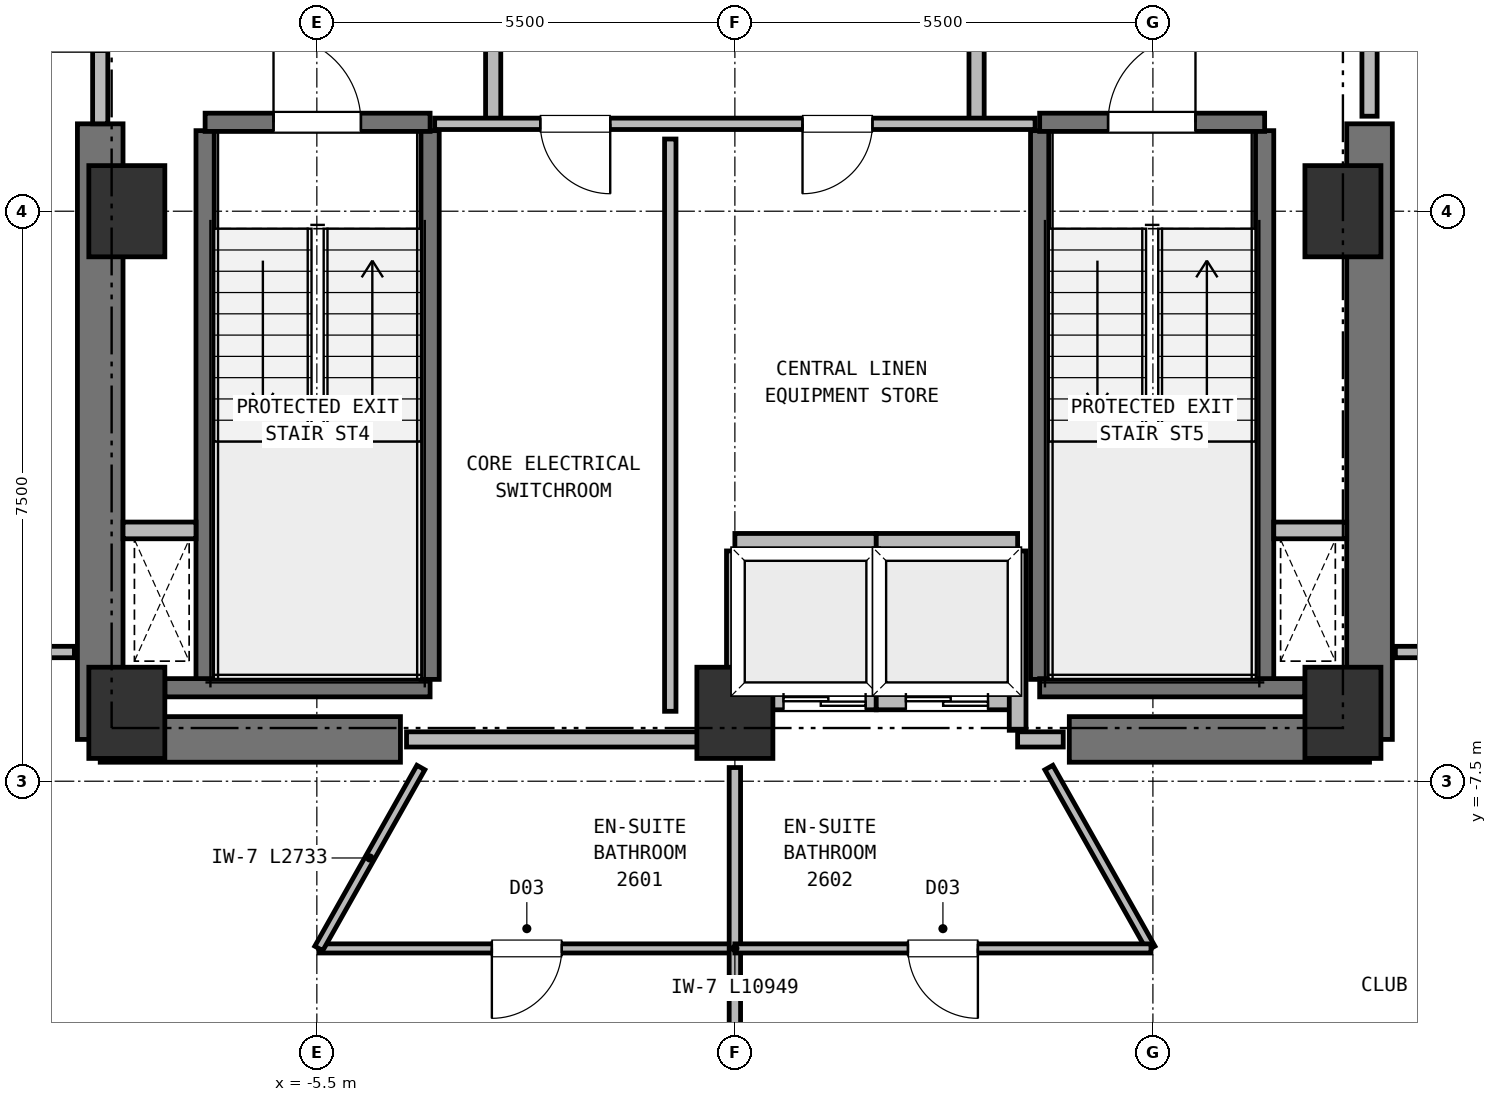
"""IFC4 building model, lengths in metres.
Left out: names, types, materials, properties, quantities, classifications, styles, units other than length and angle.
Written with IfcOpenShell. Run it as: python <this file> out.ifc"""

import sys

from ifc_helpers import new_model, si_unit, direction, frame, frame_2d, origin, origin_2d, place, context, subcontext, project, spatial, rectangle, extrude, element, fill, save


model = new_model("IFC4")
c1 = context("Model", 3, precision=1e-05, world=origin(), true_north=direction((0.0, 1.0)))
c2 = subcontext(c1, "Body", "Model", "MODEL_VIEW")
j1 = project(units=[si_unit("LENGTHUNIT", "METRE"), si_unit("PLANEANGLEUNIT", "RADIAN")], contexts=[c1])
p1 = place(None, origin())
s1 = spatial("IfcSite", under=j1, at=p1, CompositionType="ELEMENT")
p2 = place(p1, origin())
s2 = spatial("IfcBuilding", under=s1, at=p2, CompositionType="ELEMENT")
p3 = place(p2, frame((0.0, 0.0, 97.25)))
s3 = spatial("IfcBuildingStorey", under=s2, at=p3, CompositionType="ELEMENT", Elevation=97.25)
for number, where, z_axis, x_axis in (
    (1, (-8.0, -6.6, 0.0), (0.0, 0.0, 1.0), (1.0, 0.0, 0.0)),
    (2, (0.0, -6.6, 0.0), (0.0, 0.0, 1.0), (1.0, 0.0, 0.0)),
    (3, (8.0, -6.6, 0.0), (0.0, 0.0, 1.0), (1.0, 0.0, 0.0)),
    (4, (8.0, 0.0, 0.0), (0.0, 0.0, 1.0), (1.0, 0.0, 0.0)),
    (5, (-8.0, 0.0, 0.0), (0.0, 0.0, 1.0), (1.0, 0.0, 0.0)),
):
    element("IfcColumn", number, at=place(p3, frame(where, z_axis=z_axis, x_axis=x_axis)), inside=s3, PredefinedType="COLUMN", context=c2, shape_type="SweptSolid", body=[
        extrude(rectangle(XDim=1.0, YDim=1.2, at=origin_2d()), origin(), (0.0, 0.0, 1.0), 3.75),
    ])
for number, where, z_axis, x_axis in (
    (6, (-8.35, -6.95, 0.0), (0.0, 0.0, 1.0), (1.0, 0.0, 0.0)),
    (7, (4.4, -6.95, 0.0), (0.0, 0.0, 1.0), (1.0, 0.0, 0.0)),
):
    element("IfcWall", number, at=place(p3, frame(where, z_axis=z_axis, x_axis=x_axis)), inside=s3, PredefinedType="SHEAR", context=c2, shape_type="SweptSolid", body=[
        extrude(rectangle(XDim=3.95, YDim=0.6, at=frame_2d((1.975, 0.0))), origin(), (0.0, 0.0, 1.0), 3.5),
    ])
for number, where, z_axis, x_axis in (
    (8, (-8.35, -6.95, 0.0), (0.0, 0.0, 1.0), (0.0, 1.0, 0.0)),
    (9, (8.35, -6.95, 0.0), (0.0, 0.0, 1.0), (0.0, 1.0, 0.0)),
):
    element("IfcWall", number, at=place(p3, frame(where, z_axis=z_axis, x_axis=x_axis)), inside=s3, PredefinedType="SHEAR", context=c2, shape_type="SweptSolid", body=[
        extrude(rectangle(XDim=8.1, YDim=0.6, at=frame_2d((4.05, 0.0))), origin(), (0.0, 0.0, 1.0), 3.5),
    ])
p4 = place(p3, frame((-6.97, -6.16, 0.0), z_axis=(0.0, 0.0, 1.0), x_axis=(0.0, 1.0, 0.0)))
e10 = element("IfcWall", 10, at=p4, inside=s3, PredefinedType="SHEAR", context=c2, shape_type="SweptSolid", body=[
    extrude(rectangle(XDim=7.22, YDim=0.24, at=frame_2d((3.61, 0.0))), origin(), (0.0, 0.0, 1.0), 3.5),
])
p5 = place(p3, frame((-7.5, -6.27, 0.0), z_axis=(0.0, 0.0, 1.0), x_axis=(1.0, 0.0, 0.0)))
e11 = element("IfcWall", 11, at=p5, inside=s3, PredefinedType="SHEAR", context=c2, shape_type="SweptSolid", body=[
    extrude(rectangle(XDim=3.49, YDim=0.24, at=frame_2d((1.745, 0.0))), origin(), (0.0, 0.0, 1.0), 3.5),
])
p6 = place(p3, frame((-4.01, -6.16, 0.0), z_axis=(0.0, 0.0, 1.0), x_axis=(0.0, 1.0, 0.0)))
e12 = element("IfcWall", 12, at=p6, inside=s3, PredefinedType="SHEAR", context=c2, shape_type="SweptSolid", body=[
    extrude(rectangle(XDim=7.22, YDim=0.24, at=frame_2d((3.61, 0.0))), origin(), (0.0, 0.0, 1.0), 3.5),
])
p7 = place(p3, frame((-6.97, 1.17, 0.0), z_axis=(0.0, 0.0, 1.0), x_axis=(1.0, 0.0, 0.0)))
e13 = element("IfcWall", 13, at=p7, inside=s3, PredefinedType="SHEAR", context=c2, shape_type="SweptSolid", body=[
    extrude(rectangle(XDim=2.96, YDim=0.24, at=frame_2d((1.48, 0.0))), origin(), (0.0, 0.0, 1.0), 3.5),
])
p8 = place(p7, frame((0.9, 0.0, 0.0)))
e14 = element("IfcOpeningElement", 14, at=p8, cuts=e13, PredefinedType="OPENING", context=c2, shape_type="SweptSolid", body=[
    extrude(rectangle(XDim=1.15, YDim=2.15, at=frame_2d((0.575, 1.075))), frame((0.0, 0.13, 0.0), z_axis=(0.0, -1.0, 0.0), x_axis=(1.0, 0.0, 0.0)), (0.0, 0.0, 1.0), 0.26),
])
for number, where, z_axis, x_axis in (
    (15, (4.01, -6.16, 0.0), (0.0, 0.0, 1.0), (0.0, 1.0, 0.0)),
    (16, (6.97, -6.16, 0.0), (0.0, 0.0, 1.0), (0.0, 1.0, 0.0)),
):
    element("IfcWall", number, at=place(p3, frame(where, z_axis=z_axis, x_axis=x_axis)), inside=s3, PredefinedType="SHEAR", context=c2, shape_type="SweptSolid", body=[
        extrude(rectangle(XDim=7.22, YDim=0.24, at=frame_2d((3.61, 0.0))), origin(), (0.0, 0.0, 1.0), 3.5),
    ])
p9 = place(p3, frame((4.01, -6.27, 0.0), z_axis=(0.0, 0.0, 1.0), x_axis=(1.0, 0.0, 0.0)))
e17 = element("IfcWall", 17, at=p9, inside=s3, PredefinedType="SHEAR", context=c2, shape_type="SweptSolid", body=[
    extrude(rectangle(XDim=3.49, YDim=0.24, at=frame_2d((1.745, 0.0))), origin(), (0.0, 0.0, 1.0), 3.5),
])
p10 = place(p3, frame((4.01, 1.17, 0.0), z_axis=(0.0, 0.0, 1.0), x_axis=(1.0, 0.0, 0.0)))
e18 = element("IfcWall", 18, at=p10, inside=s3, PredefinedType="SHEAR", context=c2, shape_type="SweptSolid", body=[
    extrude(rectangle(XDim=2.96, YDim=0.24, at=frame_2d((1.48, 0.0))), origin(), (0.0, 0.0, 1.0), 3.5),
])
p11 = place(p10, frame((0.9, 0.0, 0.0)))
e19 = element("IfcOpeningElement", 19, at=p11, cuts=e18, PredefinedType="OPENING", context=c2, shape_type="SweptSolid", body=[
    extrude(rectangle(XDim=1.15, YDim=2.15, at=frame_2d((0.575, 1.075))), frame((0.0, 0.13, 0.0), z_axis=(0.0, -1.0, 0.0), x_axis=(1.0, 0.0, 0.0)), (0.0, 0.0, 1.0), 0.26),
])
for number, where, z_axis, x_axis in (
    (20, (-8.05, -4.2, 0.0), (0.0, 0.0, 1.0), (1.0, 0.0, 0.0)),
    (21, (7.09, -4.2, 0.0), (0.0, 0.0, 1.0), (1.0, 0.0, 0.0)),
):
    element("IfcWall", number, at=place(p3, frame(where, z_axis=z_axis, x_axis=x_axis)), inside=s3, PredefinedType="PARTITIONING", context=c2, shape_type="SweptSolid", body=[
        extrude(rectangle(XDim=0.96, YDim=0.22, at=frame_2d((0.48, 0.0))), origin(), (0.0, 0.0, 1.0), 3.5),
    ])
p12 = place(p3, frame((0.0, -6.45, 0.0), z_axis=(0.0, 0.0, 1.0), x_axis=(1.0, 0.0, 0.0)))
e22 = element("IfcWall", 22, at=p12, inside=s3, PredefinedType="PARTITIONING", context=c2, shape_type="SweptSolid", body=[
    extrude(rectangle(XDim=1.86, YDim=0.22, at=frame_2d((0.93, 0.0))), origin(), (0.0, 0.0, 1.0), 3.12),
])
p13 = place(p12, frame((0.64, 0.0, 0.0)))
e23 = element("IfcOpeningElement", 23, at=p13, cuts=e22, PredefinedType="OPENING", context=c2, shape_type="SweptSolid", body=[
    extrude(rectangle(XDim=1.08, YDim=2.15, at=frame_2d((0.54, 1.075))), frame((0.0, 0.12, 0.0), z_axis=(0.0, -1.0, 0.0), x_axis=(1.0, 0.0, 0.0)), (0.0, 0.0, 1.0), 0.24),
])
for number, where, z_axis, x_axis in (
    (24, (0.0, -4.35, 0.0), (0.0, 0.0, 1.0), (1.0, 0.0, 0.0)),
    (25, (0.0, -6.33, 0.0), (0.0, 0.0, 1.0), (0.0, 1.0, 0.0)),
    (26, (1.86, -6.33, 0.0), (0.0, 0.0, 1.0), (0.0, 1.0, 0.0)),
):
    element("IfcWall", number, at=place(p3, frame(where, z_axis=z_axis, x_axis=x_axis)), inside=s3, PredefinedType="PARTITIONING", context=c2, shape_type="SweptSolid", body=[
        extrude(rectangle(XDim=1.86, YDim=0.22, at=frame_2d((0.93, 0.0))), origin(), (0.0, 0.0, 1.0), 3.5),
    ])
p14 = place(p3, frame((1.86, -6.45, 0.0), z_axis=(0.0, 0.0, 1.0), x_axis=(1.0, 0.0, 0.0)))
e27 = element("IfcWall", 27, at=p14, inside=s3, PredefinedType="PARTITIONING", context=c2, shape_type="SweptSolid", body=[
    extrude(rectangle(XDim=1.86, YDim=0.22, at=frame_2d((0.93, 0.0))), origin(), (0.0, 0.0, 1.0), 3.12),
])
p15 = place(p14, frame((0.39, 0.0, 0.0)))
e28 = element("IfcOpeningElement", 28, at=p15, cuts=e27, PredefinedType="OPENING", context=c2, shape_type="SweptSolid", body=[
    extrude(rectangle(XDim=1.08, YDim=2.15, at=frame_2d((0.54, 1.075))), frame((0.0, 0.12, 0.0), z_axis=(0.0, -1.0, 0.0), x_axis=(1.0, 0.0, 0.0)), (0.0, 0.0, 1.0), 0.24),
])
p16 = place(p3, frame((1.86, -4.35, 0.0), z_axis=(0.0, 0.0, 1.0), x_axis=(1.0, 0.0, 0.0)))
e29 = element("IfcWall", 29, at=p16, inside=s3, PredefinedType="PARTITIONING", context=c2, shape_type="SweptSolid", body=[
    extrude(rectangle(XDim=1.86, YDim=0.22, at=frame_2d((0.93, 0.0))), origin(), (0.0, 0.0, 1.0), 3.5),
])
p17 = place(p3, frame((3.72, -6.83, 0.0), z_axis=(0.0, 0.0, 1.0), x_axis=(0.0, 1.0, 0.0)))
e30 = element("IfcWall", 30, at=p17, inside=s3, PredefinedType="PARTITIONING", context=c2, shape_type="SweptSolid", body=[
    extrude(rectangle(XDim=2.36, YDim=0.22, at=frame_2d((1.18, 0.0))), origin(), (0.0, 0.0, 1.0), 3.5),
])
p18 = place(p3, frame((-3.18, 1.15, 0.0), z_axis=(0.0, 0.0, 1.0), x_axis=(0.0, 1.0, 0.0)))
e31 = element("IfcWall", 31, at=p18, inside=s3, PredefinedType="PARTITIONING", context=c2, shape_type="SweptSolid", body=[
    extrude(rectangle(XDim=3.3, YDim=0.2, at=frame_2d((1.65, 0.0))), origin(), (0.0, 0.0, 1.0), 3.5),
])
p19 = place(p18, frame((1.08, 0.0, 0.0)))
e32 = element("IfcOpeningElement", 32, at=p19, cuts=e31, PredefinedType="OPENING", context=c2, shape_type="SweptSolid", body=[
    extrude(rectangle(XDim=1.15, YDim=2.15, at=frame_2d((0.575, 1.075))), frame((0.0, 0.11, 0.0), z_axis=(0.0, -1.0, 0.0), x_axis=(1.0, 0.0, 0.0)), (0.0, 0.0, 1.0), 0.22),
])
p20 = place(p3, frame((3.18, 1.15, 0.0), z_axis=(0.0, 0.0, 1.0), x_axis=(0.0, 1.0, 0.0)))
e33 = element("IfcWall", 33, at=p20, inside=s3, PredefinedType="PARTITIONING", context=c2, shape_type="SweptSolid", body=[
    extrude(rectangle(XDim=3.3, YDim=0.2, at=frame_2d((1.65, 0.0))), origin(), (0.0, 0.0, 1.0), 3.5),
])
p21 = place(p20, frame((1.08, 0.0, 0.0)))
e34 = element("IfcOpeningElement", 34, at=p21, cuts=e33, PredefinedType="OPENING", context=c2, shape_type="SweptSolid", body=[
    extrude(rectangle(XDim=1.15, YDim=2.15, at=frame_2d((0.575, 1.075))), frame((0.0, 0.11, 0.0), z_axis=(0.0, -1.0, 0.0), x_axis=(1.0, 0.0, 0.0)), (0.0, 0.0, 1.0), 0.22),
])
p22 = place(p3, frame((-8.35, 1.15, 0.0), z_axis=(0.0, 0.0, 1.0), x_axis=(0.0, 1.0, 0.0)))
e35 = element("IfcWall", 35, at=p22, inside=s3, PredefinedType="PARTITIONING", context=c2, shape_type="SweptSolid", body=[
    extrude(rectangle(XDim=5.4, YDim=0.2, at=frame_2d((2.7, 0.0))), origin(), (0.0, 0.0, 1.0), 3.5),
])
p23 = place(p22, frame((0.95, 0.0, 0.0)))
e36 = element("IfcOpeningElement", 36, at=p23, cuts=e35, PredefinedType="OPENING", context=c2, shape_type="SweptSolid", body=[
    extrude(rectangle(XDim=1.15, YDim=2.15, at=frame_2d((0.575, 1.075))), frame((0.0, 0.11, 0.0), z_axis=(0.0, -1.0, 0.0), x_axis=(1.0, 0.0, 0.0)), (0.0, 0.0, 1.0), 0.22),
])
p24 = place(p3, frame((8.35, 1.25, 0.0), z_axis=(0.0, 0.0, 1.0), x_axis=(0.0, 1.0, 0.0)))
e37 = element("IfcWall", 37, at=p24, inside=s3, PredefinedType="PARTITIONING", context=c2, shape_type="SweptSolid", body=[
    extrude(rectangle(XDim=5.3, YDim=0.2, at=frame_2d((2.65, 0.0))), origin(), (0.0, 0.0, 1.0), 3.5),
])
p25 = place(p24, frame((0.95, 0.0, 0.0)))
e38 = element("IfcOpeningElement", 38, at=p25, cuts=e37, PredefinedType="OPENING", context=c2, shape_type="SweptSolid", body=[
    extrude(rectangle(XDim=1.15, YDim=2.15, at=frame_2d((0.575, 1.075))), frame((0.0, 0.11, 0.0), z_axis=(0.0, -1.0, 0.0), x_axis=(1.0, 0.0, 0.0)), (0.0, 0.0, 1.0), 0.22),
])
p26 = place(p3, frame((3.95, 1.15, 0.0), z_axis=(0.0, 0.0, 1.0), x_axis=(-1.0, 0.0, 0.0)))
e39 = element("IfcWall", 39, at=p26, inside=s3, PredefinedType="PARTITIONING", context=c2, shape_type="SweptSolid", body=[
    extrude(rectangle(XDim=7.9, YDim=0.15, at=frame_2d((3.95, 0.0))), origin(), (0.0, 0.0, 1.0), 3.5),
])
p27 = place(p26, frame((5.59, 0.0, 0.0)))
e40 = element("IfcOpeningElement", 40, at=p27, cuts=e39, PredefinedType="OPENING", context=c2, shape_type="SweptSolid", body=[
    extrude(rectangle(XDim=0.92, YDim=2.05, at=frame_2d((0.46, 1.025))), frame((0.0, 0.085, 0.0), z_axis=(0.0, -1.0, 0.0), x_axis=(1.0, 0.0, 0.0)), (0.0, 0.0, 1.0), 0.17),
])
p28 = place(p26, frame((2.14, 0.0, 0.0)))
e41 = element("IfcOpeningElement", 41, at=p28, cuts=e39, PredefinedType="OPENING", context=c2, shape_type="SweptSolid", body=[
    extrude(rectangle(XDim=0.92, YDim=2.05, at=frame_2d((0.46, 1.025))), frame((0.0, 0.085, 0.0), z_axis=(0.0, -1.0, 0.0), x_axis=(1.0, 0.0, 0.0)), (0.0, 0.0, 1.0), 0.17),
])
p29 = place(p3, frame((-4.32, -6.95, 0.0), z_axis=(0.0, 0.0, 1.0), x_axis=(1.0, 0.0, 0.0)))
e42 = element("IfcWall", 42, at=p29, inside=s3, PredefinedType="PARTITIONING", context=c2, shape_type="SweptSolid", body=[
    extrude(rectangle(XDim=4.32, YDim=0.2, at=frame_2d((2.16, 0.0))), origin(), (0.0, 0.0, 1.0), 3.5),
])
p30 = place(p3, frame((3.72, -6.95, 0.0), z_axis=(0.0, 0.0, 1.0), x_axis=(1.0, 0.0, 0.0)))
e43 = element("IfcWall", 43, at=p30, inside=s3, PredefinedType="PARTITIONING", context=c2, shape_type="SweptSolid", body=[
    extrude(rectangle(XDim=0.6, YDim=0.2, at=frame_2d((0.3, 0.0))), origin(), (0.0, 0.0, 1.0), 3.5),
])
p31 = place(p3, frame((-0.85, -6.58, 0.0), z_axis=(0.0, 0.0, 1.0), x_axis=(0.0, 1.0, 0.0)))
e44 = element("IfcWall", 44, at=p31, inside=s3, PredefinedType="PARTITIONING", context=c2, shape_type="SweptSolid", body=[
    extrude(rectangle(XDim=7.53, YDim=0.15, at=frame_2d((3.765, 0.0))), origin(), (0.0, 0.0, 1.0), 3.5),
])
p32 = place(p3, frame((-8.69, -5.8, 0.0), z_axis=(0.0, 0.0, 1.0), x_axis=(-1.0, 0.0, 0.0)))
e45 = element("IfcWall", 45, at=p32, inside=s3, PredefinedType="PARTITIONING", context=c2, shape_type="SweptSolid", body=[
    extrude(rectangle(XDim=2.02, YDim=0.15, at=frame_2d((1.01, 0.0))), origin(), (0.0, 0.0, 1.0), 3.5),
])
p33 = place(p32, frame((0.52, 0.0, 0.0)))
e46 = element("IfcOpeningElement", 46, at=p33, cuts=e45, PredefinedType="OPENING", context=c2, shape_type="SweptSolid", body=[
    extrude(rectangle(XDim=1.06, YDim=2.15, at=frame_2d((0.53, 1.075))), frame((0.0, 0.085, 0.0), z_axis=(0.0, -1.0, 0.0), x_axis=(1.0, 0.0, 0.0)), (0.0, 0.0, 1.0), 0.17),
])
p34 = place(p3, frame((10.71, -5.8, 0.0), z_axis=(0.0, 0.0, 1.0), x_axis=(-1.0, 0.0, 0.0)))
e47 = element("IfcWall", 47, at=p34, inside=s3, PredefinedType="PARTITIONING", context=c2, shape_type="SweptSolid", body=[
    extrude(rectangle(XDim=2.02, YDim=0.15, at=frame_2d((1.01, 0.0))), origin(), (0.0, 0.0, 1.0), 3.5),
])
p35 = place(p34, frame((0.52, 0.0, 0.0)))
e48 = element("IfcOpeningElement", 48, at=p35, cuts=e47, PredefinedType="OPENING", context=c2, shape_type="SweptSolid", body=[
    extrude(rectangle(XDim=1.06, YDim=2.15, at=frame_2d((0.53, 1.075))), frame((0.0, 0.085, 0.0), z_axis=(0.0, -1.0, 0.0), x_axis=(1.0, 0.0, 0.0)), (0.0, 0.0, 1.0), 0.17),
])
p36 = place(p3, frame((0.0, -9.7, 0.0), z_axis=(0.0, 0.0, 1.0), x_axis=(-1.0, 0.0, 0.0)))
e49 = element("IfcWall", 49, at=p36, inside=s3, PredefinedType="PARTITIONING", context=c2, shape_type="SweptSolid", body=[
    extrude(rectangle(XDim=5.475, YDim=0.12, at=frame_2d((2.737, 0.0))), origin(), (0.0, 0.0, 1.0), 3.5),
])
p37 = place(p36, frame((2.277, 0.0, 0.0)))
e50 = element("IfcOpeningElement", 50, at=p37, cuts=e49, PredefinedType="OPENING", context=c2, shape_type="SweptSolid", body=[
    extrude(rectangle(XDim=0.92, YDim=2.1, at=frame_2d((0.46, 1.05))), frame((0.0, 0.07, 0.0), z_axis=(0.0, -1.0, 0.0), x_axis=(1.0, 0.0, 0.0)), (0.0, 0.0, 1.0), 0.14),
])
p38 = place(p3, frame((-5.475, -9.7, 0.0), z_axis=(0.0, 0.0, 1.0), x_axis=(0.491533175525, 0.870858850422, 0.0)))
e51 = element("IfcWall", 51, at=p38, inside=s3, PredefinedType="PARTITIONING", context=c2, shape_type="SweptSolid", body=[
    extrude(rectangle(XDim=2.733, YDim=0.12, at=frame_2d((1.366, 0.0))), origin(), (0.0, 0.0, 1.0), 3.5),
])
p39 = place(p3, frame((0.0, -7.32, 0.0), z_axis=(0.0, 0.0, 1.0), x_axis=(0.0, -1.0, 0.0)))
e52 = element("IfcWall", 52, at=p39, inside=s3, PredefinedType="PARTITIONING", context=c2, shape_type="SweptSolid", body=[
    extrude(rectangle(XDim=10.627, YDim=0.15, at=frame_2d((5.314, 0.0))), origin(), (0.0, 0.0, 1.0), 3.5),
])
p40 = place(p3, frame((4.131, -7.32, 0.0), z_axis=(0.0, 0.0, 1.0), x_axis=(0.491533175525, -0.870858850422, 0.0)))
e53 = element("IfcWall", 53, at=p40, inside=s3, PredefinedType="PARTITIONING", context=c2, shape_type="SweptSolid", body=[
    extrude(rectangle(XDim=2.733, YDim=0.12, at=frame_2d((1.366, 0.0))), origin(), (0.0, 0.0, 1.0), 3.5),
])
p41 = place(p3, frame((5.475, -9.7, 0.0), z_axis=(0.0, 0.0, 1.0), x_axis=(-1.0, 0.0, 0.0)))
e54 = element("IfcWall", 54, at=p41, inside=s3, PredefinedType="PARTITIONING", context=c2, shape_type="SweptSolid", body=[
    extrude(rectangle(XDim=5.475, YDim=0.12, at=frame_2d((2.737, 0.0))), origin(), (0.0, 0.0, 1.0), 3.5),
])
p42 = place(p41, frame((2.277, 0.0, 0.0)))
e55 = element("IfcOpeningElement", 55, at=p42, cuts=e54, PredefinedType="OPENING", context=c2, shape_type="SweptSolid", body=[
    extrude(rectangle(XDim=0.92, YDim=2.1, at=frame_2d((0.46, 1.05))), frame((0.0, 0.07, 0.0), z_axis=(0.0, -1.0, 0.0), x_axis=(1.0, 0.0, 0.0)), (0.0, 0.0, 1.0), 0.14),
])
p43 = place(p8, origin())
e56 = element("IfcDoor", 56, at=p43, inside=s3, OperationType="SINGLE_SWING_LEFT", PredefinedType="DOOR", context=c2, shape_type="SweptSolid", body=[
    extrude(rectangle(XDim=1.15, YDim=2.15, at=frame_2d((0.575, 1.075))), frame((0.0, 0.025, 0.0), z_axis=(0.0, -1.0, 0.0), x_axis=(1.0, 0.0, 0.0)), (0.0, 0.0, 1.0), 0.05),
])
fill(e14, e56)
p44 = place(p11, origin())
e57 = element("IfcDoor", 57, at=p44, inside=s3, OperationType="SINGLE_SWING_RIGHT", PredefinedType="DOOR", context=c2, shape_type="SweptSolid", body=[
    extrude(rectangle(XDim=1.15, YDim=2.15, at=frame_2d((0.575, 1.075))), frame((0.0, 0.025, 0.0), z_axis=(0.0, -1.0, 0.0), x_axis=(1.0, 0.0, 0.0)), (0.0, 0.0, 1.0), 0.05),
])
fill(e19, e57)
p45 = place(p13, origin())
e58 = element("IfcDoor", 58, at=p45, inside=s3, OperationType="DOUBLE_DOOR_SLIDING", PredefinedType="DOOR", context=c2, shape_type="SweptSolid", body=[
    extrude(rectangle(XDim=1.08, YDim=2.15, at=frame_2d((0.54, 1.075))), frame((0.0, 0.025, 0.0), z_axis=(0.0, -1.0, 0.0), x_axis=(1.0, 0.0, 0.0)), (0.0, 0.0, 1.0), 0.05),
])
fill(e23, e58)
p46 = place(p15, origin())
e59 = element("IfcDoor", 59, at=p46, inside=s3, OperationType="DOUBLE_DOOR_SLIDING", PredefinedType="DOOR", context=c2, shape_type="SweptSolid", body=[
    extrude(rectangle(XDim=1.08, YDim=2.15, at=frame_2d((0.54, 1.075))), frame((0.0, 0.025, 0.0), z_axis=(0.0, -1.0, 0.0), x_axis=(1.0, 0.0, 0.0)), (0.0, 0.0, 1.0), 0.05),
])
fill(e28, e59)
p47 = place(p23, origin())
e60 = element("IfcDoor", 60, at=p47, inside=s3, OperationType="SINGLE_SWING_LEFT", PredefinedType="DOOR", context=c2, shape_type="SweptSolid", body=[
    extrude(rectangle(XDim=1.15, YDim=2.15, at=frame_2d((0.575, 1.075))), frame((0.0, 0.025, 0.0), z_axis=(0.0, -1.0, 0.0), x_axis=(1.0, 0.0, 0.0)), (0.0, 0.0, 1.0), 0.05),
])
fill(e36, e60)
p48 = place(p27, origin())
e61 = element("IfcDoor", 61, at=p48, inside=s3, OperationType="SINGLE_SWING_LEFT", PredefinedType="DOOR", context=c2, shape_type="SweptSolid", body=[
    extrude(rectangle(XDim=0.92, YDim=2.05, at=frame_2d((0.46, 1.025))), frame((0.0, 0.025, 0.0), z_axis=(0.0, -1.0, 0.0), x_axis=(1.0, 0.0, 0.0)), (0.0, 0.0, 1.0), 0.05),
])
fill(e40, e61)
p49 = place(p28, origin())
e62 = element("IfcDoor", 62, at=p49, inside=s3, OperationType="SINGLE_SWING_RIGHT", PredefinedType="DOOR", context=c2, shape_type="SweptSolid", body=[
    extrude(rectangle(XDim=0.92, YDim=2.05, at=frame_2d((0.46, 1.025))), frame((0.0, 0.025, 0.0), z_axis=(0.0, -1.0, 0.0), x_axis=(1.0, 0.0, 0.0)), (0.0, 0.0, 1.0), 0.05),
])
fill(e41, e62)
p50 = place(p37, origin())
e63 = element("IfcDoor", 63, at=p50, inside=s3, OperationType="SINGLE_SWING_RIGHT", PredefinedType="DOOR", context=c2, shape_type="SweptSolid", body=[
    extrude(rectangle(XDim=0.92, YDim=2.1, at=frame_2d((0.46, 1.05))), frame((0.0, 0.025, 0.0), z_axis=(0.0, -1.0, 0.0), x_axis=(1.0, 0.0, 0.0)), (0.0, 0.0, 1.0), 0.05),
])
fill(e50, e63)
p51 = place(p42, origin())
e64 = element("IfcDoor", 64, at=p51, inside=s3, OperationType="SINGLE_SWING_LEFT", PredefinedType="DOOR", context=c2, shape_type="SweptSolid", body=[
    extrude(rectangle(XDim=0.92, YDim=2.1, at=frame_2d((0.46, 1.05))), frame((0.0, 0.025, 0.0), z_axis=(0.0, -1.0, 0.0), x_axis=(1.0, 0.0, 0.0)), (0.0, 0.0, 1.0), 0.05),
])
fill(e55, e64)
save(model, sys.argv[1])
